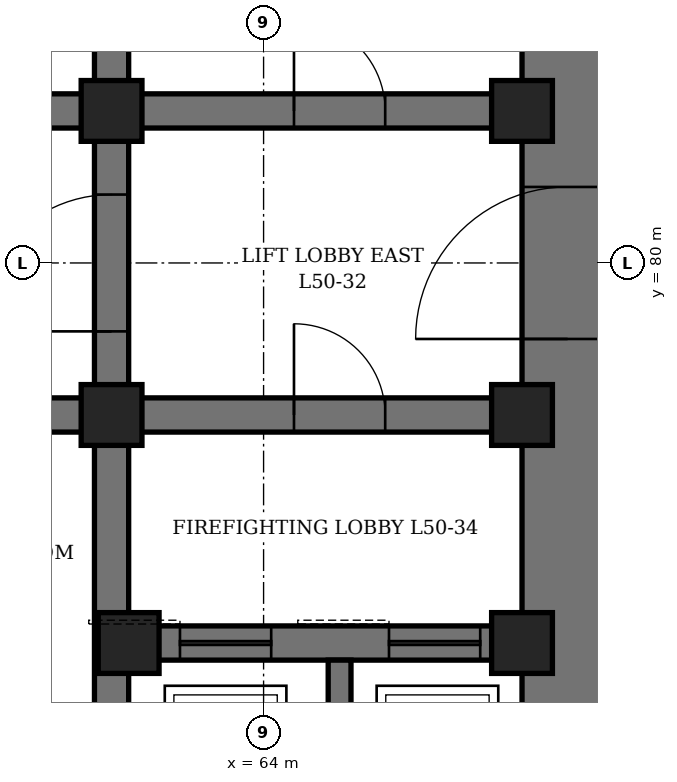
"""IFC4 building model, lengths in metres.
Left out: names, types, materials, properties, quantities, classifications, styles, units other than length and angle.
Written with IfcOpenShell. Run it as: python <this file> out.ifc"""

import sys

from ifc_helpers import new_model, si_unit, direction, frame, frame_2d, origin, origin_2d, place, context, subcontext, project, spatial, rectangle, hollow_rectangle, extrude, element, fill, save


model = new_model("IFC4")
c1 = context("Model", 3, precision=1e-05, world=origin(), true_north=direction((0.0, 1.0)))
c2 = subcontext(c1, "Body", "Model", "MODEL_VIEW")
j1 = project(units=[si_unit("LENGTHUNIT", "METRE"), si_unit("PLANEANGLEUNIT", "RADIAN")], contexts=[c1])
p1 = place(None, origin())
s1 = spatial("IfcSite", under=j1, at=p1, CompositionType="ELEMENT")
p2 = place(p1, origin())
s2 = spatial("IfcBuilding", under=s1, at=p2, CompositionType="ELEMENT")
p3 = place(p2, frame((0.0, 0.0, 223.3)))
s3 = spatial("IfcBuildingStorey", under=s2, at=p3, CompositionType="ELEMENT", Elevation=223.3)
p4 = place(p3, frame((68.0, 70.4, 0.0), z_axis=(0.0, 0.0, 1.0), x_axis=(0.0, 1.0, 0.0)))
e1 = element("IfcWall", 1, at=p4, inside=s3, PredefinedType="SHEAR", context=c2, shape_type="SweptSolid", body=[
    extrude(rectangle(XDim=19.2, YDim=1.2, at=frame_2d((9.6, 0.0))), origin(), (0.0, 0.0, 1.0), 4.2),
])
p5 = place(p4, frame((8.6, 0.0, 0.0)))
e2 = element("IfcOpeningElement", 2, at=p5, cuts=e1, PredefinedType="OPENING", context=c2, shape_type="SweptSolid", body=[
    extrude(rectangle(XDim=2.0, YDim=2.4, at=frame_2d((1.0, 1.2))), frame((0.0, 0.61, 0.0), z_axis=(0.0, -1.0, 0.0), x_axis=(1.0, 0.0, 0.0)), (0.0, 0.0, 1.0), 1.22),
])
p6 = place(p3, frame((62.0, 71.6, 0.0), z_axis=(0.0, 0.0, 1.0), x_axis=(0.0, 1.0, 0.0)))
e3 = element("IfcWall", 3, at=p6, inside=s3, PredefinedType="SHEAR", context=c2, shape_type="SweptSolid", body=[
    extrude(rectangle(XDim=16.8, YDim=0.45, at=frame_2d((8.4, 0.0))), origin(), (0.0, 0.0, 1.0), 4.2),
])
p7 = place(p6, frame((7.5, 0.0, 0.0)))
e4 = element("IfcOpeningElement", 4, at=p7, cuts=e3, PredefinedType="OPENING", context=c2, shape_type="SweptSolid", body=[
    extrude(rectangle(XDim=1.8, YDim=2.4, at=frame_2d((0.9, 1.2))), frame((0.0, 0.235, 0.0), z_axis=(0.0, -1.0, 0.0), x_axis=(1.0, 0.0, 0.0)), (0.0, 0.0, 1.0), 0.47),
])
p8 = place(p3, frame((62.225, 75.0, 0.0), z_axis=(0.0, 0.0, 1.0), x_axis=(1.0, 0.0, 0.0)))
e5 = element("IfcWall", 5, at=p8, inside=s3, PredefinedType="SHEAR", context=c2, shape_type="SweptSolid", body=[
    extrude(rectangle(XDim=5.175, YDim=0.45, at=frame_2d((2.587, 0.0))), origin(), (0.0, 0.0, 1.0), 4.2),
])
p9 = place(p8, frame((0.675, 0.0, 0.0)))
e6 = element("IfcOpeningElement", 6, at=p9, cuts=e5, PredefinedType="OPENING", context=c2, shape_type="SweptSolid", body=[
    extrude(rectangle(XDim=1.2, YDim=2.2, at=frame_2d((0.6, 1.1))), frame((0.0, 0.235, 0.0), z_axis=(0.0, -1.0, 0.0), x_axis=(1.0, 0.0, 0.0)), (0.0, 0.0, 1.0), 0.47),
])
p10 = place(p8, frame((3.425, 0.0, 0.0)))
e7 = element("IfcOpeningElement", 7, at=p10, cuts=e5, PredefinedType="OPENING", context=c2, shape_type="SweptSolid", body=[
    extrude(rectangle(XDim=1.2, YDim=2.2, at=frame_2d((0.6, 1.1))), frame((0.0, 0.235, 0.0), z_axis=(0.0, -1.0, 0.0), x_axis=(1.0, 0.0, 0.0)), (0.0, 0.0, 1.0), 0.47),
])
p11 = place(p3, frame((62.225, 78.0, 0.0), z_axis=(0.0, 0.0, 1.0), x_axis=(1.0, 0.0, 0.0)))
e8 = element("IfcWall", 8, at=p11, inside=s3, PredefinedType="SHEAR", context=c2, shape_type="SweptSolid", body=[
    extrude(rectangle(XDim=5.175, YDim=0.45, at=frame_2d((2.587, 0.0))), origin(), (0.0, 0.0, 1.0), 4.2),
])
p12 = place(p11, frame((2.175, 0.0, 0.0)))
e9 = element("IfcOpeningElement", 9, at=p12, cuts=e8, PredefinedType="OPENING", context=c2, shape_type="SweptSolid", body=[
    extrude(rectangle(XDim=1.2, YDim=2.1, at=frame_2d((0.6, 1.05))), frame((0.0, 0.235, 0.0), z_axis=(0.0, -1.0, 0.0), x_axis=(1.0, 0.0, 0.0)), (0.0, 0.0, 1.0), 0.47),
])
p13 = place(p3, frame((62.225, 82.0, 0.0), z_axis=(0.0, 0.0, 1.0), x_axis=(1.0, 0.0, 0.0)))
e10 = element("IfcWall", 10, at=p13, inside=s3, PredefinedType="SHEAR", context=c2, shape_type="SweptSolid", body=[
    extrude(rectangle(XDim=5.175, YDim=0.45, at=frame_2d((2.587, 0.0))), origin(), (0.0, 0.0, 1.0), 4.2),
])
p14 = place(p13, frame((2.175, 0.0, 0.0)))
e11 = element("IfcOpeningElement", 11, at=p14, cuts=e10, PredefinedType="OPENING", context=c2, shape_type="SweptSolid", body=[
    extrude(rectangle(XDim=1.2, YDim=2.1, at=frame_2d((0.6, 1.05))), frame((0.0, 0.235, 0.0), z_axis=(0.0, -1.0, 0.0), x_axis=(1.0, 0.0, 0.0)), (0.0, 0.0, 1.0), 0.47),
])
p15 = place(p3, frame((50.225, 78.0, 0.0), z_axis=(0.0, 0.0, 1.0), x_axis=(1.0, 0.0, 0.0)))
e12 = element("IfcWall", 12, at=p15, inside=s3, PredefinedType="SHEAR", context=c2, shape_type="SweptSolid", body=[
    extrude(rectangle(XDim=11.55, YDim=0.45, at=frame_2d((5.775, 0.0))), origin(), (0.0, 0.0, 1.0), 4.2),
])
p16 = place(p15, frame((0.825, 0.0, 0.0)))
e13 = element("IfcOpeningElement", 13, at=p16, cuts=e12, PredefinedType="OPENING", context=c2, shape_type="SweptSolid", body=[
    extrude(rectangle(XDim=0.9, YDim=2.1, at=frame_2d((0.45, 1.05))), frame((0.0, 0.235, 0.0), z_axis=(0.0, -1.0, 0.0), x_axis=(1.0, 0.0, 0.0)), (0.0, 0.0, 1.0), 0.47),
])
p17 = place(p15, frame((3.825, 0.0, 0.0)))
e14 = element("IfcOpeningElement", 14, at=p17, cuts=e12, PredefinedType="OPENING", context=c2, shape_type="SweptSolid", body=[
    extrude(rectangle(XDim=0.9, YDim=2.1, at=frame_2d((0.45, 1.05))), frame((0.0, 0.235, 0.0), z_axis=(0.0, -1.0, 0.0), x_axis=(1.0, 0.0, 0.0)), (0.0, 0.0, 1.0), 0.47),
])
p18 = place(p15, frame((6.825, 0.0, 0.0)))
e15 = element("IfcOpeningElement", 15, at=p18, cuts=e12, PredefinedType="OPENING", context=c2, shape_type="SweptSolid", body=[
    extrude(rectangle(XDim=0.9, YDim=2.1, at=frame_2d((0.45, 1.05))), frame((0.0, 0.235, 0.0), z_axis=(0.0, -1.0, 0.0), x_axis=(1.0, 0.0, 0.0)), (0.0, 0.0, 1.0), 0.47),
])
p19 = place(p15, frame((9.825, 0.0, 0.0)))
e16 = element("IfcOpeningElement", 16, at=p19, cuts=e12, PredefinedType="OPENING", context=c2, shape_type="SweptSolid", body=[
    extrude(rectangle(XDim=0.9, YDim=2.1, at=frame_2d((0.45, 1.05))), frame((0.0, 0.235, 0.0), z_axis=(0.0, -1.0, 0.0), x_axis=(1.0, 0.0, 0.0)), (0.0, 0.0, 1.0), 0.47),
])
p20 = place(p3, frame((50.225, 82.0, 0.0), z_axis=(0.0, 0.0, 1.0), x_axis=(1.0, 0.0, 0.0)))
e17 = element("IfcWall", 17, at=p20, inside=s3, PredefinedType="SHEAR", context=c2, shape_type="SweptSolid", body=[
    extrude(rectangle(XDim=11.55, YDim=0.45, at=frame_2d((5.775, 0.0))), origin(), (0.0, 0.0, 1.0), 4.2),
])
p21 = place(p20, frame((0.825, 0.0, 0.0)))
e18 = element("IfcOpeningElement", 18, at=p21, cuts=e17, PredefinedType="OPENING", context=c2, shape_type="SweptSolid", body=[
    extrude(rectangle(XDim=0.9, YDim=2.1, at=frame_2d((0.45, 1.05))), frame((0.0, 0.235, 0.0), z_axis=(0.0, -1.0, 0.0), x_axis=(1.0, 0.0, 0.0)), (0.0, 0.0, 1.0), 0.47),
])
p22 = place(p20, frame((3.825, 0.0, 0.0)))
e19 = element("IfcOpeningElement", 19, at=p22, cuts=e17, PredefinedType="OPENING", context=c2, shape_type="SweptSolid", body=[
    extrude(rectangle(XDim=0.9, YDim=2.1, at=frame_2d((0.45, 1.05))), frame((0.0, 0.235, 0.0), z_axis=(0.0, -1.0, 0.0), x_axis=(1.0, 0.0, 0.0)), (0.0, 0.0, 1.0), 0.47),
])
p23 = place(p20, frame((6.825, 0.0, 0.0)))
e20 = element("IfcOpeningElement", 20, at=p23, cuts=e17, PredefinedType="OPENING", context=c2, shape_type="SweptSolid", body=[
    extrude(rectangle(XDim=0.9, YDim=2.1, at=frame_2d((0.45, 1.05))), frame((0.0, 0.235, 0.0), z_axis=(0.0, -1.0, 0.0), x_axis=(1.0, 0.0, 0.0)), (0.0, 0.0, 1.0), 0.47),
])
p24 = place(p20, frame((9.825, 0.0, 0.0)))
e21 = element("IfcOpeningElement", 21, at=p24, cuts=e17, PredefinedType="OPENING", context=c2, shape_type="SweptSolid", body=[
    extrude(rectangle(XDim=0.9, YDim=2.1, at=frame_2d((0.45, 1.05))), frame((0.0, 0.235, 0.0), z_axis=(0.0, -1.0, 0.0), x_axis=(1.0, 0.0, 0.0)), (0.0, 0.0, 1.0), 0.47),
])
p25 = place(p3, frame((65.0, 71.6, 0.0), z_axis=(0.0, 0.0, 1.0), x_axis=(0.0, 1.0, 0.0)))
e22 = element("IfcWall", 22, at=p25, inside=s3, PredefinedType="SHEAR", context=c2, shape_type="SweptSolid", body=[
    extrude(rectangle(XDim=3.175, YDim=0.3, at=frame_2d((1.587, 0.0))), origin(), (0.0, 0.0, 1.0), 4.2),
])
for number, where, z_axis, x_axis in (
    (23, (62.0, 78.0, 0.0), (0.0, 0.0, 1.0), (1.0, 0.0, 0.0)),
    (24, (62.0, 82.0, 0.0), (0.0, 0.0, 1.0), (1.0, 0.0, 0.0)),
    (25, (62.225, 75.0, 0.0), (0.0, 0.0, 1.0), (1.0, 0.0, 0.0)),
    (26, (67.4, 75.0, 0.0), (0.0, 0.0, 1.0), (1.0, 0.0, 0.0)),
    (27, (67.4, 78.0, 0.0), (0.0, 0.0, 1.0), (1.0, 0.0, 0.0)),
    (28, (67.4, 82.0, 0.0), (0.0, 0.0, 1.0), (1.0, 0.0, 0.0)),
):
    element("IfcColumn", number, at=place(p3, frame(where, z_axis=z_axis, x_axis=x_axis)), inside=s3, PredefinedType="COLUMN", context=c2, shape_type="SweptSolid", body=[
        extrude(hollow_rectangle(XDim=0.8, YDim=0.8, WallThickness=0.1, at=origin_2d()), origin(), (0.0, 0.0, 1.0), 4.2),
    ])
p26 = place(p14, origin())
e29 = element("IfcDoor", 29, at=p26, inside=s3, OperationType="SINGLE_SWING_LEFT", PredefinedType="DOOR", context=c2, shape_type="SweptSolid", body=[
    extrude(rectangle(XDim=1.2, YDim=2.1, at=frame_2d((0.6, 1.05))), frame((0.0, 0.225, 0.0), z_axis=(0.0, -1.0, 0.0), x_axis=(1.0, 0.0, 0.0)), (0.0, 0.0, 1.0), 0.449),
])
fill(e11, e29)
p27 = place(p5, origin())
e30 = element("IfcDoor", 30, at=p27, inside=s3, OperationType="DOUBLE_DOOR_SINGLE_SWING", PredefinedType="DOOR", context=c2, shape_type="SweptSolid", body=[
    extrude(rectangle(XDim=2.0, YDim=2.4, at=frame_2d((1.0, 1.2))), frame((0.0, 0.35, 0.0), z_axis=(0.0, -1.0, 0.0), x_axis=(1.0, 0.0, 0.0)), (0.0, 0.0, 1.0), 0.7),
])
fill(e2, e30)
p28 = place(p7, origin())
e31 = element("IfcDoor", 31, at=p28, inside=s3, OperationType="DOUBLE_DOOR_SINGLE_SWING", PredefinedType="DOOR", context=c2, shape_type="SweptSolid", body=[
    extrude(rectangle(XDim=1.8, YDim=2.4, at=frame_2d((0.9, 1.2))), frame((0.0, 0.225, 0.0), z_axis=(0.0, -1.0, 0.0), x_axis=(1.0, 0.0, 0.0)), (0.0, 0.0, 1.0), 0.449),
])
fill(e4, e31)
p29 = place(p12, origin())
e32 = element("IfcDoor", 32, at=p29, inside=s3, OperationType="SINGLE_SWING_RIGHT", PredefinedType="DOOR", context=c2, shape_type="SweptSolid", body=[
    extrude(rectangle(XDim=1.2, YDim=2.1, at=frame_2d((0.6, 1.05))), frame((0.0, 0.225, 0.0), z_axis=(0.0, -1.0, 0.0), x_axis=(1.0, 0.0, 0.0)), (0.0, 0.0, 1.0), 0.449),
])
fill(e9, e32)
p30 = place(p9, origin())
e33 = element("IfcDoor", 33, at=p30, inside=s3, OperationType="SLIDING_TO_LEFT", PredefinedType="DOOR", context=c2, shape_type="SweptSolid", body=[
    extrude(rectangle(XDim=1.2, YDim=2.2, at=frame_2d((0.6, 1.1))), frame((0.0, 0.225, 0.0), z_axis=(0.0, -1.0, 0.0), x_axis=(1.0, 0.0, 0.0)), (0.0, 0.0, 1.0), 0.449),
])
fill(e6, e33)
p31 = place(p10, origin())
e34 = element("IfcDoor", 34, at=p31, inside=s3, OperationType="SLIDING_TO_LEFT", PredefinedType="DOOR", context=c2, shape_type="SweptSolid", body=[
    extrude(rectangle(XDim=1.2, YDim=2.2, at=frame_2d((0.6, 1.1))), frame((0.0, 0.225, 0.0), z_axis=(0.0, -1.0, 0.0), x_axis=(1.0, 0.0, 0.0)), (0.0, 0.0, 1.0), 0.449),
])
fill(e7, e34)
save(model, sys.argv[1])
